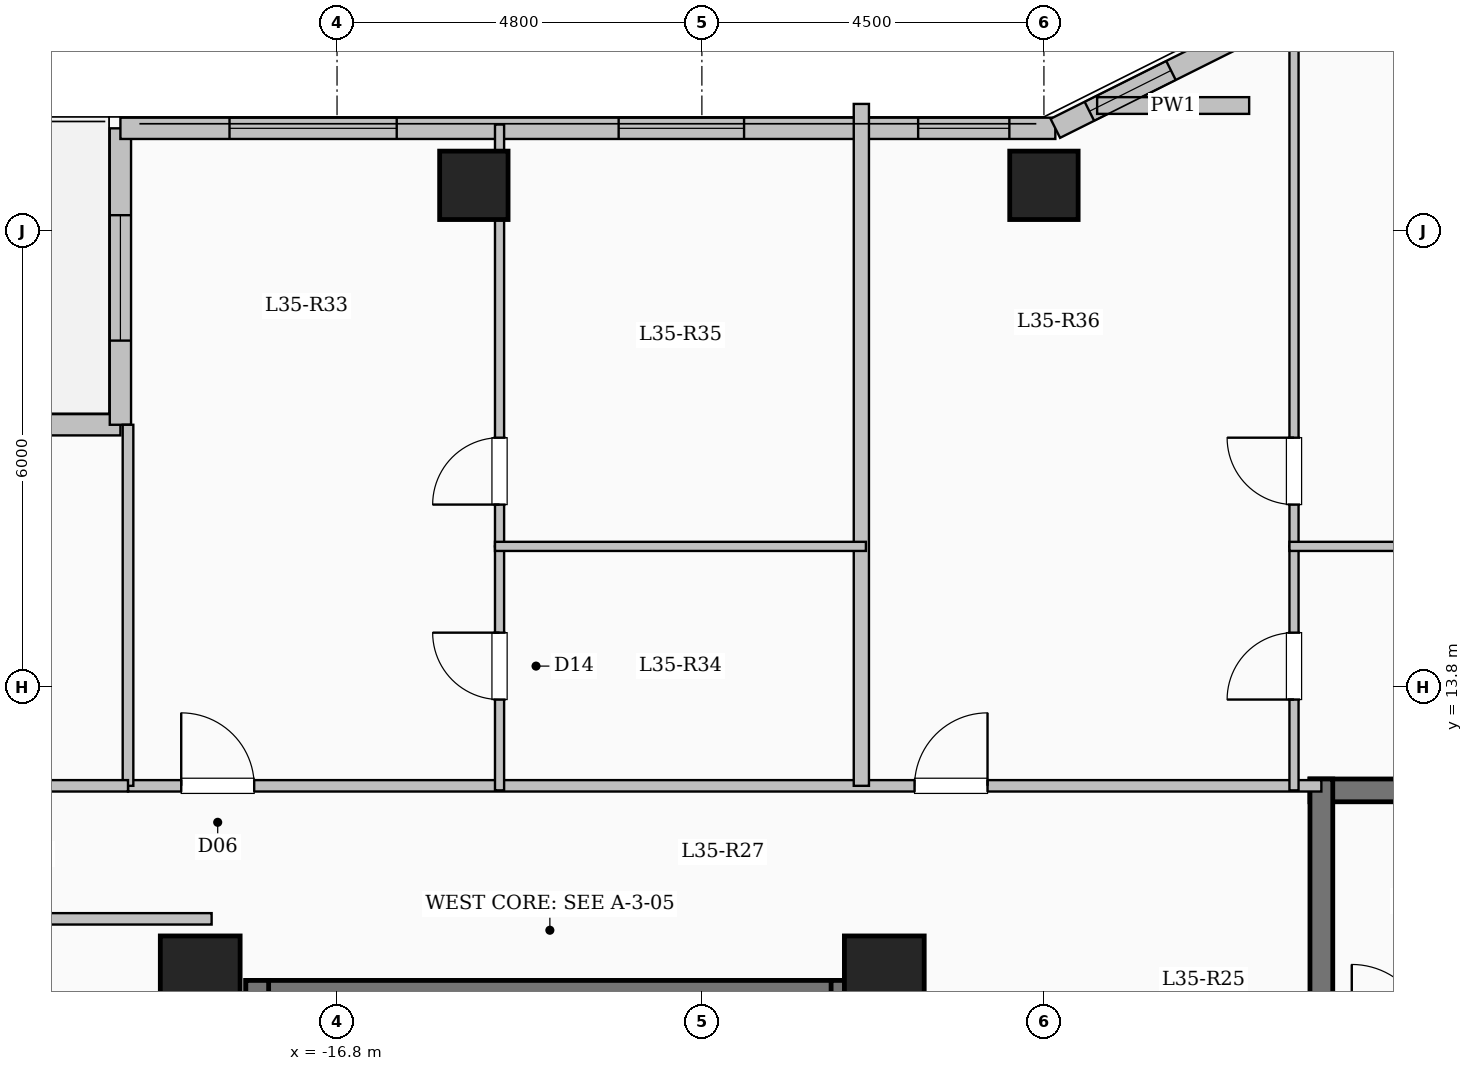
"""IFC4 building model, lengths in metres.
Left out: names, types, materials, properties, quantities, classifications, styles, units other than length and angle.
Written with IfcOpenShell. Run it as: python <this file> out.ifc"""

import sys

from ifc_helpers import new_model, si_unit, direction, frame, frame_2d, origin, origin_2d, place, context, subcontext, project, spatial, rectangle, extrude, element, fill, save


model = new_model("IFC4")
c1 = context("Model", 3, precision=1e-05, world=origin(), true_north=direction((0.0, 1.0)))
c2 = subcontext(c1, "Body", "Model", "MODEL_VIEW")
j1 = project(units=[si_unit("LENGTHUNIT", "METRE"), si_unit("PLANEANGLEUNIT", "RADIAN")], contexts=[c1])
p1 = place(None, origin())
s1 = spatial("IfcSite", under=j1, at=p1, CompositionType="ELEMENT")
p2 = place(p1, origin())
s2 = spatial("IfcBuilding", under=s1, at=p2, CompositionType="ELEMENT")
p3 = place(p2, frame((0.0, 0.0, 132.6)))
s3 = spatial("IfcBuildingStorey", under=s2, at=p3, CompositionType="ELEMENT", Elevation=132.6)
for number, where, z_axis, x_axis in (
    (1, (-9.6, 10.0, 0.0), (0.0, 0.0, 1.0), (1.0, 0.0, 0.0)),
    (2, (-18.6, 10.0, 0.0), (0.0, 0.0, 1.0), (1.0, 0.0, 0.0)),
):
    element("IfcColumn", number, at=place(p3, frame(where, z_axis=z_axis, x_axis=x_axis)), inside=s3, PredefinedType="COLUMN", context=c2, shape_type="SweptSolid", body=[
        extrude(rectangle(XDim=1.05, YDim=1.05, at=origin_2d()), origin(), (0.0, 0.0, 1.0), 3.35),
    ])
for number, where, z_axis, x_axis in (
    (3, (-15.0, 20.4, 0.0), (0.0, 0.0, 1.0), (1.0, 0.0, 0.0)),
    (4, (-7.5, 20.4, 0.0), (0.0, 0.0, 1.0), (1.0, 0.0, 0.0)),
):
    element("IfcColumn", number, at=place(p3, frame(where, z_axis=z_axis, x_axis=x_axis)), inside=s3, PredefinedType="COLUMN", context=c2, shape_type="SweptSolid", body=[
        extrude(rectangle(XDim=0.9, YDim=0.9, at=origin_2d()), origin(), (0.0, 0.0, 1.0), 3.35),
    ])
p4 = place(p3, frame((-25.05, 17.25, 0.0), z_axis=(0.0, 0.0, 1.0), x_axis=(1.0, 0.0, 0.0)))
e5 = element("IfcWall", 5, at=p4, inside=s3, PredefinedType="SOLIDWALL", context=c2, shape_type="SweptSolid", body=[
    extrude(rectangle(XDim=5.4, YDim=0.28, at=frame_2d((2.7, 0.0))), origin(), (0.0, 0.0, 1.0), 3.1),
])
p5 = place(p4, frame((2.25, 0.0, 0.0)))
e6 = element("IfcOpeningElement", 6, at=p5, cuts=e5, PredefinedType="OPENING", context=c2, shape_type="SweptSolid", body=[
    extrude(rectangle(XDim=1.1, YDim=2.2, at=frame_2d((0.55, 1.1))), frame((0.0, 0.15, 0.0), z_axis=(0.0, -1.0, 0.0), x_axis=(1.0, 0.0, 0.0)), (0.0, 0.0, 1.0), 0.3),
])
p6 = place(p4, frame((0.63, 0.0, 0.95)))
e7 = element("IfcOpeningElement", 7, at=p6, cuts=e5, PredefinedType="OPENING", context=c2, shape_type="SweptSolid", body=[
    extrude(rectangle(XDim=1.2, YDim=1.5, at=frame_2d((0.6, 0.75))), frame((0.0, 0.15, 0.0), z_axis=(0.0, -1.0, 0.0), x_axis=(1.0, 0.0, 0.0)), (0.0, 0.0, 1.0), 0.3),
])
p7 = place(p3, frame((-19.65, 17.25, 0.0), z_axis=(0.0, 0.0, 1.0), x_axis=(0.0, 1.0, 0.0)))
e8 = element("IfcWall", 8, at=p7, inside=s3, PredefinedType="SOLIDWALL", context=c2, shape_type="SweptSolid", body=[
    extrude(rectangle(XDim=3.9, YDim=0.28, at=frame_2d((1.95, 0.0))), origin(), (0.0, 0.0, 1.0), 3.1),
])
p8 = place(p7, frame((1.107, 0.0, 0.9)))
e9 = element("IfcOpeningElement", 9, at=p8, cuts=e8, PredefinedType="OPENING", context=c2, shape_type="SweptSolid", body=[
    extrude(rectangle(XDim=1.65, YDim=1.6, at=frame_2d((0.825, 0.8))), frame((0.0, 0.15, 0.0), z_axis=(0.0, -1.0, 0.0), x_axis=(1.0, 0.0, 0.0)), (0.0, 0.0, 1.0), 0.3),
])
p9 = place(p3, frame((-19.65, 21.15, 0.0), z_axis=(0.0, 0.0, 1.0), x_axis=(1.0, 0.0, 0.0)))
e10 = element("IfcWall", 10, at=p9, inside=s3, PredefinedType="SOLIDWALL", context=c2, shape_type="SweptSolid", body=[
    extrude(rectangle(XDim=12.3, YDim=0.28, at=frame_2d((6.15, 0.0))), origin(), (0.0, 0.0, 1.0), 3.1),
])
p10 = place(p9, frame((1.435, 0.0, 0.9)))
e11 = element("IfcOpeningElement", 11, at=p10, cuts=e10, PredefinedType="OPENING", context=c2, shape_type="SweptSolid", body=[
    extrude(rectangle(XDim=2.2, YDim=1.75, at=frame_2d((1.1, 0.875))), frame((0.0, 0.15, 0.0), z_axis=(0.0, -1.0, 0.0), x_axis=(1.0, 0.0, 0.0)), (0.0, 0.0, 1.0), 0.3),
])
p11 = place(p9, frame((6.555, 0.0, 0.9)))
e12 = element("IfcOpeningElement", 12, at=p11, cuts=e10, PredefinedType="OPENING", context=c2, shape_type="SweptSolid", body=[
    extrude(rectangle(XDim=1.65, YDim=1.6, at=frame_2d((0.825, 0.8))), frame((0.0, 0.15, 0.0), z_axis=(0.0, -1.0, 0.0), x_axis=(1.0, 0.0, 0.0)), (0.0, 0.0, 1.0), 0.3),
])
p12 = place(p9, frame((10.495, 0.0, 0.95)))
e13 = element("IfcOpeningElement", 13, at=p12, cuts=e10, PredefinedType="OPENING", context=c2, shape_type="SweptSolid", body=[
    extrude(rectangle(XDim=1.2, YDim=1.5, at=frame_2d((0.6, 0.75))), frame((0.0, 0.15, 0.0), z_axis=(0.0, -1.0, 0.0), x_axis=(1.0, 0.0, 0.0)), (0.0, 0.0, 1.0), 0.3),
])
p13 = place(p3, frame((-7.35, 21.15, 0.0), z_axis=(0.0, 0.0, 1.0), x_axis=(0.894427191, 0.4472135955, 0.0)))
e14 = element("IfcWall", 14, at=p13, inside=s3, PredefinedType="SOLIDWALL", context=c2, shape_type="SweptSolid", body=[
    extrude(rectangle(XDim=3.354, YDim=0.28, at=frame_2d((1.677, 0.0))), origin(), (0.0, 0.0, 1.0), 3.1),
])
p14 = place(p13, frame((0.501, 0.0, 0.95)))
e15 = element("IfcOpeningElement", 15, at=p14, cuts=e14, PredefinedType="OPENING", context=c2, shape_type="SweptSolid", body=[
    extrude(rectangle(XDim=1.2, YDim=1.5, at=frame_2d((0.6, 0.75))), frame((0.0, 0.15, 0.0), z_axis=(0.0, -1.0, 0.0), x_axis=(1.0, 0.0, 0.0)), (0.0, 0.0, 1.0), 0.3),
])
p15 = place(p3, frame((-6.8, 21.45, 0.0), z_axis=(0.0, 0.0, 1.0), x_axis=(1.0, 0.0, 0.0)))
e16 = element("IfcWall", 16, at=p15, inside=s3, PredefinedType="PARAPET", context=c2, shape_type="SweptSolid", body=[
    extrude(rectangle(XDim=2.0, YDim=0.22, at=frame_2d((1.0, 0.0))), origin(), (0.0, 0.0, 1.0), 0.85),
])
p16 = place(p3, frame((-18.0, 9.79, 0.0), z_axis=(0.0, 0.0, 1.0), x_axis=(1.0, 0.0, 0.0)))
e17 = element("IfcWall", 17, at=p16, inside=s3, PredefinedType="SHEAR", context=c2, shape_type="SweptSolid", body=[
    extrude(rectangle(XDim=8.0, YDim=0.3, at=frame_2d((4.0, 0.0))), origin(), (0.0, 0.0, 1.0), 3.35),
])
for number, where, z_axis, x_axis in (
    (18, (-17.85, 6.35, 0.0), (0.0, 0.0, 1.0), (0.0, 1.0, 0.0)),
    (19, (-10.15, 6.35, 0.0), (0.0, 0.0, 1.0), (0.0, 1.0, 0.0)),
):
    element("IfcWall", number, at=place(p3, frame(where, z_axis=z_axis, x_axis=x_axis)), inside=s3, PredefinedType="SHEAR", context=c2, shape_type="SweptSolid", body=[
        extrude(rectangle(XDim=3.59, YDim=0.3, at=frame_2d((1.795, 0.0))), origin(), (0.0, 0.0, 1.0), 3.35),
    ])
p17 = place(p3, frame((-4.0, 12.44, 0.0), z_axis=(0.0, 0.0, 1.0), x_axis=(1.0, 0.0, 0.0)))
e20 = element("IfcWall", 20, at=p17, inside=s3, PredefinedType="SHEAR", context=c2, shape_type="SweptSolid", body=[
    extrude(rectangle(XDim=8.0, YDim=0.3, at=frame_2d((4.0, 0.0))), origin(), (0.0, 0.0, 1.0), 3.35),
])
p18 = place(p3, frame((-3.85, 9.0, 0.0), z_axis=(0.0, 0.0, 1.0), x_axis=(0.0, 1.0, 0.0)))
e21 = element("IfcWall", 21, at=p18, inside=s3, PredefinedType="SHEAR", context=c2, shape_type="SweptSolid", body=[
    extrude(rectangle(XDim=3.59, YDim=0.3, at=frame_2d((1.795, 0.0))), origin(), (0.0, 0.0, 1.0), 3.35),
])
p19 = place(p3, frame((-19.55, 12.5, 0.0), z_axis=(0.0, 0.0, 1.0), x_axis=(1.0, 0.0, 0.0)))
e22 = element("IfcWall", 22, at=p19, inside=s3, PredefinedType="PARTITIONING", context=c2, shape_type="SweptSolid", body=[
    extrude(rectangle(XDim=15.7, YDim=0.15, at=frame_2d((7.85, 0.0))), origin(), (0.0, 0.0, 1.0), 3.1),
])
p20 = place(p19, frame((0.7, 0.0, 0.0)))
e23 = element("IfcOpeningElement", 23, at=p20, cuts=e22, PredefinedType="OPENING", context=c2, shape_type="SweptSolid", body=[
    extrude(rectangle(XDim=0.96, YDim=2.15, at=frame_2d((0.48, 1.075))), frame((0.0, 0.085, 0.0), z_axis=(0.0, -1.0, 0.0), x_axis=(1.0, 0.0, 0.0)), (0.0, 0.0, 1.0), 0.17),
])
p21 = place(p19, frame((10.348, 0.0, 0.0)))
e24 = element("IfcOpeningElement", 24, at=p21, cuts=e22, PredefinedType="OPENING", context=c2, shape_type="SweptSolid", body=[
    extrude(rectangle(XDim=0.96, YDim=2.15, at=frame_2d((0.48, 1.075))), frame((0.0, 0.085, 0.0), z_axis=(0.0, -1.0, 0.0), x_axis=(1.0, 0.0, 0.0)), (0.0, 0.0, 1.0), 0.17),
])
p22 = place(p3, frame((-9.902, 12.5, 0.0), z_axis=(0.0, 0.0, 1.0), x_axis=(0.0, 1.0, 0.0)))
e25 = element("IfcWall", 25, at=p22, inside=s3, PredefinedType="SOLIDWALL", context=c2, shape_type="SweptSolid", body=[
    extrude(rectangle(XDim=8.971, YDim=0.2, at=frame_2d((4.485, 0.0))), origin(), (0.0, 0.0, 1.0), 3.1),
])
p23 = place(p3, frame((-14.662, 12.44, 0.0), z_axis=(0.0, 0.0, 1.0), x_axis=(0.0, 1.0, 0.0)))
e26 = element("IfcWall", 26, at=p23, inside=s3, PredefinedType="PARTITIONING", context=c2, shape_type="SweptSolid", body=[
    extrude(rectangle(XDim=3.21, YDim=0.12, at=frame_2d((1.605, 0.0))), origin(), (0.0, 0.0, 1.0), 3.1),
])
p24 = place(p23, frame((1.195, 0.0, 0.0)))
e27 = element("IfcOpeningElement", 27, at=p24, cuts=e26, PredefinedType="OPENING", context=c2, shape_type="SweptSolid", body=[
    extrude(rectangle(XDim=0.88, YDim=2.1, at=frame_2d((0.44, 1.05))), frame((0.0, 0.07, 0.0), z_axis=(0.0, -1.0, 0.0), x_axis=(1.0, 0.0, 0.0)), (0.0, 0.0, 1.0), 0.14),
])
p25 = place(p3, frame((-14.662, 15.65, 0.0), z_axis=(0.0, 0.0, 1.0), x_axis=(0.0, 1.0, 0.0)))
e28 = element("IfcWall", 28, at=p25, inside=s3, PredefinedType="PARTITIONING", context=c2, shape_type="SweptSolid", body=[
    extrude(rectangle(XDim=5.55, YDim=0.12, at=frame_2d((2.775, 0.0))), origin(), (0.0, 0.0, 1.0), 3.1),
])
p26 = place(p25, frame((0.55, 0.0, 0.0)))
e29 = element("IfcOpeningElement", 29, at=p26, cuts=e28, PredefinedType="OPENING", context=c2, shape_type="SweptSolid", body=[
    extrude(rectangle(XDim=0.88, YDim=2.1, at=frame_2d((0.44, 1.05))), frame((0.0, 0.07, 0.0), z_axis=(0.0, -1.0, 0.0), x_axis=(1.0, 0.0, 0.0)), (0.0, 0.0, 1.0), 0.14),
])
p27 = place(p3, frame((-14.722, 15.65, 0.0), z_axis=(0.0, 0.0, 1.0), x_axis=(1.0, 0.0, 0.0)))
e30 = element("IfcWall", 30, at=p27, inside=s3, PredefinedType="PARTITIONING", context=c2, shape_type="SweptSolid", body=[
    extrude(rectangle(XDim=4.88, YDim=0.12, at=frame_2d((2.44, 0.0))), origin(), (0.0, 0.0, 1.0), 2.685),
])
p28 = place(p3, frame((-4.21, 12.44, 0.0), z_axis=(0.0, 0.0, 1.0), x_axis=(0.0, 1.0, 0.0)))
e31 = element("IfcWall", 31, at=p28, inside=s3, PredefinedType="PARTITIONING", context=c2, shape_type="SweptSolid", body=[
    extrude(rectangle(XDim=3.21, YDim=0.12, at=frame_2d((1.605, 0.0))), origin(), (0.0, 0.0, 1.0), 3.1),
])
p29 = place(p28, frame((1.195, 0.0, 0.0)))
e32 = element("IfcOpeningElement", 32, at=p29, cuts=e31, PredefinedType="OPENING", context=c2, shape_type="SweptSolid", body=[
    extrude(rectangle(XDim=0.88, YDim=2.1, at=frame_2d((0.44, 1.05))), frame((0.0, 0.07, 0.0), z_axis=(0.0, -1.0, 0.0), x_axis=(1.0, 0.0, 0.0)), (0.0, 0.0, 1.0), 0.14),
])
p30 = place(p3, frame((-4.21, 15.65, 0.0), z_axis=(0.0, 0.0, 1.0), x_axis=(0.0, 1.0, 0.0)))
e33 = element("IfcWall", 33, at=p30, inside=s3, PredefinedType="PARTITIONING", context=c2, shape_type="SweptSolid", body=[
    extrude(rectangle(XDim=7.03, YDim=0.12, at=frame_2d((3.515, 0.0))), origin(), (0.0, 0.0, 1.0), 3.1),
])
p31 = place(p30, frame((0.55, 0.0, 0.0)))
e34 = element("IfcOpeningElement", 34, at=p31, cuts=e33, PredefinedType="OPENING", context=c2, shape_type="SweptSolid", body=[
    extrude(rectangle(XDim=0.88, YDim=2.1, at=frame_2d((0.44, 1.05))), frame((0.0, 0.07, 0.0), z_axis=(0.0, -1.0, 0.0), x_axis=(1.0, 0.0, 0.0)), (0.0, 0.0, 1.0), 0.14),
])
p32 = place(p3, frame((-4.27, 15.65, 0.0), z_axis=(0.0, 0.0, 1.0), x_axis=(1.0, 0.0, 0.0)))
e35 = element("IfcWall", 35, at=p32, inside=s3, PredefinedType="PARTITIONING", context=c2, shape_type="SweptSolid", body=[
    extrude(rectangle(XDim=4.88, YDim=0.12, at=frame_2d((2.44, 0.0))), origin(), (0.0, 0.0, 1.0), 2.685),
])
p33 = place(p3, frame((-25.08, 10.75, 0.0), z_axis=(0.0, 0.0, 1.0), x_axis=(1.0, 0.0, 0.0)))
e36 = element("IfcWall", 36, at=p33, inside=s3, PredefinedType="PARTITIONING", context=c2, shape_type="SweptSolid", body=[
    extrude(rectangle(XDim=6.63, YDim=0.15, at=frame_2d((3.315, 0.0))), origin(), (0.0, 0.0, 1.0), 3.1),
])
p34 = place(p3, frame((-19.55, 12.5, 0.0), z_axis=(0.0, 0.0, 1.0), x_axis=(0.0, 1.0, 0.0)))
e37 = element("IfcWall", 37, at=p34, inside=s3, PredefinedType="PARTITIONING", context=c2, shape_type="SweptSolid", body=[
    extrude(rectangle(XDim=4.75, YDim=0.14, at=frame_2d((2.375, 0.0))), origin(), (0.0, 0.0, 1.0), 3.1),
])
p35 = place(p3, frame((-25.08, 12.5, 0.0), z_axis=(0.0, 0.0, 1.0), x_axis=(1.0, 0.0, 0.0)))
e38 = element("IfcWall", 38, at=p35, inside=s3, PredefinedType="PARTITIONING", context=c2, shape_type="SweptSolid", body=[
    extrude(rectangle(XDim=5.53, YDim=0.15, at=frame_2d((2.765, 0.0))), origin(), (0.0, 0.0, 1.0), 3.1),
])
p36 = place(p35, frame((2.29, 0.0, 0.0)))
e39 = element("IfcOpeningElement", 39, at=p36, cuts=e38, PredefinedType="OPENING", context=c2, shape_type="SweptSolid", body=[
    extrude(rectangle(XDim=0.95, YDim=2.15, at=frame_2d((0.475, 1.075))), frame((0.0, 0.085, 0.0), z_axis=(0.0, -1.0, 0.0), x_axis=(1.0, 0.0, 0.0)), (0.0, 0.0, 1.0), 0.17),
])
p37 = place(p8, origin())
e40 = element("IfcWindow", 40, at=p37, inside=s3, PartitioningType="SINGLE_PANEL", PredefinedType="WINDOW", context=c2, shape_type="SweptSolid", body=[
    extrude(rectangle(XDim=1.65, YDim=1.6, at=frame_2d((0.825, 0.8))), frame((0.0, 0.03, 0.0), z_axis=(0.0, -1.0, 0.0), x_axis=(1.0, 0.0, 0.0)), (0.0, 0.0, 1.0), 0.06),
])
fill(e9, e40)
p38 = place(p10, origin())
e41 = element("IfcWindow", 41, at=p38, inside=s3, PartitioningType="SINGLE_PANEL", PredefinedType="WINDOW", context=c2, shape_type="SweptSolid", body=[
    extrude(rectangle(XDim=2.2, YDim=1.75, at=frame_2d((1.1, 0.875))), frame((0.0, 0.03, 0.0), z_axis=(0.0, -1.0, 0.0), x_axis=(1.0, 0.0, 0.0)), (0.0, 0.0, 1.0), 0.06),
])
fill(e11, e41)
p39 = place(p11, origin())
e42 = element("IfcWindow", 42, at=p39, inside=s3, PartitioningType="SINGLE_PANEL", PredefinedType="WINDOW", context=c2, shape_type="SweptSolid", body=[
    extrude(rectangle(XDim=1.65, YDim=1.6, at=frame_2d((0.825, 0.8))), frame((0.0, 0.03, 0.0), z_axis=(0.0, -1.0, 0.0), x_axis=(1.0, 0.0, 0.0)), (0.0, 0.0, 1.0), 0.06),
])
fill(e12, e42)
p40 = place(p12, origin())
e43 = element("IfcWindow", 43, at=p40, inside=s3, PartitioningType="SINGLE_PANEL", PredefinedType="WINDOW", context=c2, shape_type="SweptSolid", body=[
    extrude(rectangle(XDim=1.2, YDim=1.5, at=frame_2d((0.6, 0.75))), frame((0.0, 0.03, 0.0), z_axis=(0.0, -1.0, 0.0), x_axis=(1.0, 0.0, 0.0)), (0.0, 0.0, 1.0), 0.06),
])
fill(e13, e43)
p41 = place(p14, origin())
e44 = element("IfcWindow", 44, at=p41, inside=s3, PartitioningType="SINGLE_PANEL", PredefinedType="WINDOW", context=c2, shape_type="SweptSolid", body=[
    extrude(rectangle(XDim=1.2, YDim=1.5, at=frame_2d((0.6, 0.75))), frame((0.0, 0.03, 0.0), z_axis=(0.0, -1.0, 0.0), x_axis=(1.0, 0.0, 0.0)), (0.0, 0.0, 1.0), 0.06),
])
fill(e15, e44)
p42 = place(p20, origin())
e45 = element("IfcDoor", 45, at=p42, inside=s3, OperationType="SINGLE_SWING_LEFT", PredefinedType="DOOR", context=c2, shape_type="SweptSolid", body=[
    extrude(rectangle(XDim=0.96, YDim=2.15, at=frame_2d((0.48, 1.075))), frame((0.0, 0.025, 0.0), z_axis=(0.0, -1.0, 0.0), x_axis=(1.0, 0.0, 0.0)), (0.0, 0.0, 1.0), 0.05),
])
fill(e23, e45)
p43 = place(p24, origin())
e46 = element("IfcDoor", 46, at=p43, inside=s3, OperationType="SINGLE_SWING_RIGHT", PredefinedType="DOOR", context=c2, shape_type="SweptSolid", body=[
    extrude(rectangle(XDim=0.88, YDim=2.1, at=frame_2d((0.44, 1.05))), frame((0.0, 0.025, 0.0), z_axis=(0.0, -1.0, 0.0), x_axis=(1.0, 0.0, 0.0)), (0.0, 0.0, 1.0), 0.05),
])
fill(e27, e46)
p44 = place(p26, origin())
e47 = element("IfcDoor", 47, at=p44, inside=s3, OperationType="SINGLE_SWING_LEFT", PredefinedType="DOOR", context=c2, shape_type="SweptSolid", body=[
    extrude(rectangle(XDim=0.88, YDim=2.1, at=frame_2d((0.44, 1.05))), frame((0.0, 0.025, 0.0), z_axis=(0.0, -1.0, 0.0), x_axis=(1.0, 0.0, 0.0)), (0.0, 0.0, 1.0), 0.05),
])
fill(e29, e47)
p45 = place(p21, origin())
e48 = element("IfcDoor", 48, at=p45, inside=s3, OperationType="SINGLE_SWING_RIGHT", PredefinedType="DOOR", context=c2, shape_type="SweptSolid", body=[
    extrude(rectangle(XDim=0.96, YDim=2.15, at=frame_2d((0.48, 1.075))), frame((0.0, 0.025, 0.0), z_axis=(0.0, -1.0, 0.0), x_axis=(1.0, 0.0, 0.0)), (0.0, 0.0, 1.0), 0.05),
])
fill(e24, e48)
p46 = place(p29, origin())
e49 = element("IfcDoor", 49, at=p46, inside=s3, OperationType="SINGLE_SWING_LEFT", PredefinedType="DOOR", context=c2, shape_type="SweptSolid", body=[
    extrude(rectangle(XDim=0.88, YDim=2.1, at=frame_2d((0.44, 1.05))), frame((0.0, 0.025, 0.0), z_axis=(0.0, -1.0, 0.0), x_axis=(1.0, 0.0, 0.0)), (0.0, 0.0, 1.0), 0.05),
])
fill(e32, e49)
p47 = place(p31, origin())
e50 = element("IfcDoor", 50, at=p47, inside=s3, OperationType="SINGLE_SWING_RIGHT", PredefinedType="DOOR", context=c2, shape_type="SweptSolid", body=[
    extrude(rectangle(XDim=0.88, YDim=2.1, at=frame_2d((0.44, 1.05))), frame((0.0, 0.025, 0.0), z_axis=(0.0, -1.0, 0.0), x_axis=(1.0, 0.0, 0.0)), (0.0, 0.0, 1.0), 0.05),
])
fill(e34, e50)
save(model, sys.argv[1])
